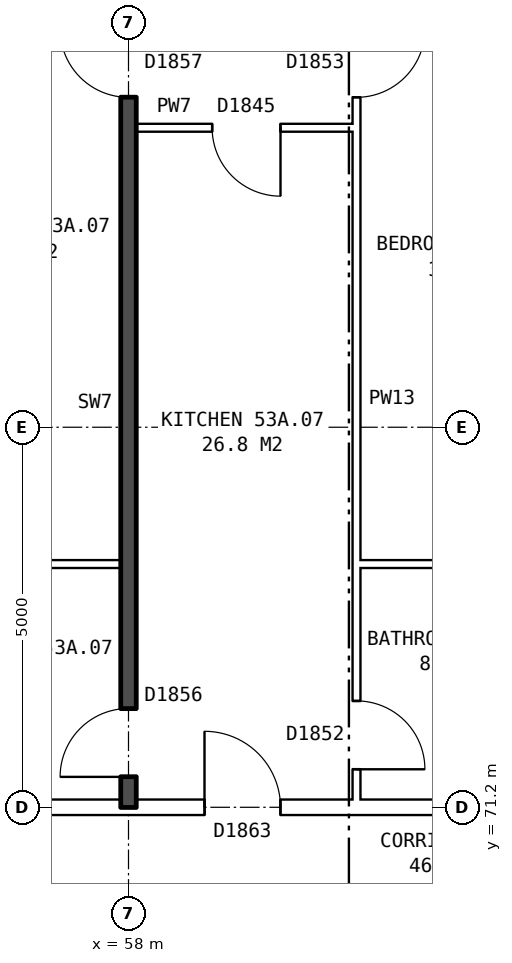
"""IFC4 building model, lengths in metres.
Left out: names, types, materials, properties, quantities, classifications, styles, units other than length and angle.
Written with IfcOpenShell. Run it as: python <this file> out.ifc"""

import sys

from ifc_helpers import new_model, si_unit, direction, frame, frame_2d, origin, place, context, subcontext, project, spatial, rectangle, extrude, element, fill, save


model = new_model("IFC4")
c1 = context("Model", 3, precision=1e-05, world=origin(), true_north=direction((0.0, 1.0)))
c2 = subcontext(c1, "Body", "Model", "MODEL_VIEW")
j1 = project(units=[si_unit("LENGTHUNIT", "METRE"), si_unit("PLANEANGLEUNIT", "RADIAN")], contexts=[c1])
p1 = place(None, origin())
s1 = spatial("IfcSite", under=j1, at=p1, CompositionType="ELEMENT")
p2 = place(p1, origin())
s2 = spatial("IfcBuilding", under=s1, at=p2, CompositionType="ELEMENT")
p3 = place(p2, frame((0.0, 0.0, 188.2)))
s3 = spatial("IfcBuildingStorey", under=s2, at=p3, CompositionType="ELEMENT", Elevation=188.2)
p4 = place(p3, frame((44.36, 71.2, 0.0), z_axis=(0.0, 0.0, 1.0), x_axis=(1.0, 0.0, 0.0)))
e1 = element("IfcWall", 1, at=p4, inside=s3, PredefinedType="PARTITIONING", context=c2, shape_type="SweptSolid", body=[
    extrude(rectangle(XDim=19.28, YDim=0.2, at=frame_2d((9.64, 0.0))), origin(), (0.0, 0.0, 1.0), 2.85),
])
p5 = place(p4, frame((14.64, 0.0, 0.0)))
e2 = element("IfcOpeningElement", 2, at=p5, cuts=e1, PredefinedType="OPENING", context=c2, shape_type="SweptSolid", body=[
    extrude(rectangle(XDim=1.0, YDim=2.1, at=frame_2d((0.5, 1.05))), frame((0.0, 0.11, 0.0), z_axis=(0.0, -1.0, 0.0), x_axis=(1.0, 0.0, 0.0)), (0.0, 0.0, 1.0), 0.22),
])
p6 = place(p4, frame((5.64, 0.0, 0.0)))
e3 = element("IfcOpeningElement", 3, at=p6, cuts=e1, PredefinedType="OPENING", context=c2, shape_type="SweptSolid", body=[
    extrude(rectangle(XDim=1.0, YDim=2.1, at=frame_2d((0.5, 1.05))), frame((0.0, 0.11, 0.0), z_axis=(0.0, -1.0, 0.0), x_axis=(1.0, 0.0, 0.0)), (0.0, 0.0, 1.0), 0.22),
])
p7 = place(p3, frame((52.1, 74.4, 0.0), z_axis=(0.0, 0.0, 1.0), x_axis=(1.0, 0.0, 0.0)))
e4 = element("IfcWall", 4, at=p7, inside=s3, PredefinedType="PARTITIONING", context=c2, shape_type="SweptSolid", body=[
    extrude(rectangle(XDim=5.8, YDim=0.1, at=frame_2d((2.9, 0.0))), origin(), (0.0, 0.0, 1.0), 2.85),
])
p8 = place(p3, frame((61.0, 74.4, 0.0), z_axis=(0.0, 0.0, 1.0), x_axis=(1.0, 0.0, 0.0)))
e5 = element("IfcWall", 5, at=p8, inside=s3, PredefinedType="PARTITIONING", context=c2, shape_type="SweptSolid", body=[
    extrude(rectangle(XDim=2.64, YDim=0.1, at=frame_2d((1.32, 0.0))), origin(), (0.0, 0.0, 1.0), 2.85),
])
p9 = place(p3, frame((58.1, 80.14, 0.0), z_axis=(0.0, 0.0, 1.0), x_axis=(1.0, 0.0, 0.0)))
e6 = element("IfcWall", 6, at=p9, inside=s3, PredefinedType="PARTITIONING", context=c2, shape_type="SweptSolid", body=[
    extrude(rectangle(XDim=2.9, YDim=0.1, at=frame_2d((1.45, 0.0))), origin(), (0.0, 0.0, 1.0), 2.85),
])
p10 = place(p9, frame((1.0, 0.0, 0.0)))
e7 = element("IfcOpeningElement", 7, at=p10, cuts=e6, PredefinedType="OPENING", context=c2, shape_type="SweptSolid", body=[
    extrude(rectangle(XDim=0.9, YDim=2.1, at=frame_2d((0.45, 1.05))), frame((0.0, 0.06, 0.0), z_axis=(0.0, -1.0, 0.0), x_axis=(1.0, 0.0, 0.0)), (0.0, 0.0, 1.0), 0.12),
])
p11 = place(p3, frame((58.0, 71.2, 0.0), z_axis=(0.0, 0.0, 1.0), x_axis=(0.0, 1.0, 0.0)))
e8 = element("IfcWall", 8, at=p11, inside=s3, PredefinedType="SOLIDWALL", context=c2, shape_type="SweptSolid", body=[
    extrude(rectangle(XDim=14.44, YDim=0.2, at=frame_2d((7.22, 0.0))), origin(), (0.0, 0.0, 1.0), 2.85),
])
p12 = place(p11, frame((9.34, 0.0, 0.0)))
e9 = element("IfcOpeningElement", 9, at=p12, cuts=e8, PredefinedType="OPENING", context=c2, shape_type="SweptSolid", body=[
    extrude(rectangle(XDim=0.9, YDim=2.1, at=frame_2d((0.45, 1.05))), frame((0.0, 0.11, 0.0), z_axis=(0.0, -1.0, 0.0), x_axis=(1.0, 0.0, 0.0)), (0.0, 0.0, 1.0), 0.22),
])
p13 = place(p11, frame((0.4, 0.0, 0.0)))
e10 = element("IfcOpeningElement", 10, at=p13, cuts=e8, PredefinedType="OPENING", context=c2, shape_type="SweptSolid", body=[
    extrude(rectangle(XDim=0.9, YDim=2.1, at=frame_2d((0.45, 1.05))), frame((0.0, 0.11, 0.0), z_axis=(0.0, -1.0, 0.0), x_axis=(1.0, 0.0, 0.0)), (0.0, 0.0, 1.0), 0.22),
])
p14 = place(p3, frame((61.0, 71.3, 0.0), z_axis=(0.0, 0.0, 1.0), x_axis=(0.0, 1.0, 0.0)))
e11 = element("IfcWall", 11, at=p14, inside=s3, PredefinedType="PARTITIONING", context=c2, shape_type="SweptSolid", body=[
    extrude(rectangle(XDim=14.34, YDim=0.1, at=frame_2d((7.17, 0.0))), origin(), (0.0, 0.0, 1.0), 2.85),
])
p15 = place(p14, frame((9.24, 0.0, 0.0)))
e12 = element("IfcOpeningElement", 12, at=p15, cuts=e11, PredefinedType="OPENING", context=c2, shape_type="SweptSolid", body=[
    extrude(rectangle(XDim=0.9, YDim=2.1, at=frame_2d((0.45, 1.05))), frame((0.0, 0.06, 0.0), z_axis=(0.0, -1.0, 0.0), x_axis=(1.0, 0.0, 0.0)), (0.0, 0.0, 1.0), 0.12),
])
p16 = place(p14, frame((0.4, 0.0, 0.0)))
e13 = element("IfcOpeningElement", 13, at=p16, cuts=e11, PredefinedType="OPENING", context=c2, shape_type="SweptSolid", body=[
    extrude(rectangle(XDim=0.9, YDim=2.1, at=frame_2d((0.45, 1.05))), frame((0.0, 0.06, 0.0), z_axis=(0.0, -1.0, 0.0), x_axis=(1.0, 0.0, 0.0)), (0.0, 0.0, 1.0), 0.12),
])
p17 = place(p15, frame((0.9, 0.0, 0.0), z_axis=(0.0, 0.0, 1.0), x_axis=(-1.0, 0.0, 0.0)))
e14 = element("IfcDoor", 14, at=p17, inside=s3, OperationType="SINGLE_SWING_LEFT", PredefinedType="DOOR", context=c2, shape_type="SweptSolid", body=[
    extrude(rectangle(XDim=0.9, YDim=2.1, at=frame_2d((0.45, 1.05))), frame((0.0, 0.025, 0.0), z_axis=(0.0, -1.0, 0.0), x_axis=(1.0, 0.0, 0.0)), (0.0, 0.0, 1.0), 0.05),
])
fill(e12, e14)
p18 = place(p12, origin())
e15 = element("IfcDoor", 15, at=p18, inside=s3, OperationType="SINGLE_SWING_RIGHT", PredefinedType="DOOR", context=c2, shape_type="SweptSolid", body=[
    extrude(rectangle(XDim=0.9, YDim=2.1, at=frame_2d((0.45, 1.05))), frame((0.0, 0.025, 0.0), z_axis=(0.0, -1.0, 0.0), x_axis=(1.0, 0.0, 0.0)), (0.0, 0.0, 1.0), 0.05),
])
fill(e9, e15)
p19 = place(p5, origin())
e16 = element("IfcDoor", 16, at=p19, inside=s3, OperationType="SINGLE_SWING_LEFT", PredefinedType="DOOR", context=c2, shape_type="SweptSolid", body=[
    extrude(rectangle(XDim=1.0, YDim=2.1, at=frame_2d((0.5, 1.05))), frame((0.0, 0.025, 0.0), z_axis=(0.0, -1.0, 0.0), x_axis=(1.0, 0.0, 0.0)), (0.0, 0.0, 1.0), 0.05),
])
fill(e2, e16)
p20 = place(p10, frame((0.9, 0.0, 0.0), z_axis=(0.0, 0.0, 1.0), x_axis=(-1.0, 0.0, 0.0)))
e17 = element("IfcDoor", 17, at=p20, inside=s3, OperationType="SINGLE_SWING_LEFT", PredefinedType="DOOR", context=c2, shape_type="SweptSolid", body=[
    extrude(rectangle(XDim=0.9, YDim=2.1, at=frame_2d((0.45, 1.05))), frame((0.0, 0.025, 0.0), z_axis=(0.0, -1.0, 0.0), x_axis=(1.0, 0.0, 0.0)), (0.0, 0.0, 1.0), 0.05),
])
fill(e7, e17)
p21 = place(p16, frame((0.9, 0.0, 0.0), z_axis=(0.0, 0.0, 1.0), x_axis=(-1.0, 0.0, 0.0)))
e18 = element("IfcDoor", 18, at=p21, inside=s3, OperationType="SINGLE_SWING_RIGHT", PredefinedType="DOOR", context=c2, shape_type="SweptSolid", body=[
    extrude(rectangle(XDim=0.9, YDim=2.1, at=frame_2d((0.45, 1.05))), frame((0.0, 0.025, 0.0), z_axis=(0.0, -1.0, 0.0), x_axis=(1.0, 0.0, 0.0)), (0.0, 0.0, 1.0), 0.05),
])
fill(e13, e18)
p22 = place(p13, origin())
e19 = element("IfcDoor", 19, at=p22, inside=s3, OperationType="SINGLE_SWING_LEFT", PredefinedType="DOOR", context=c2, shape_type="SweptSolid", body=[
    extrude(rectangle(XDim=0.9, YDim=2.1, at=frame_2d((0.45, 1.05))), frame((0.0, 0.025, 0.0), z_axis=(0.0, -1.0, 0.0), x_axis=(1.0, 0.0, 0.0)), (0.0, 0.0, 1.0), 0.05),
])
fill(e10, e19)
save(model, sys.argv[1])
